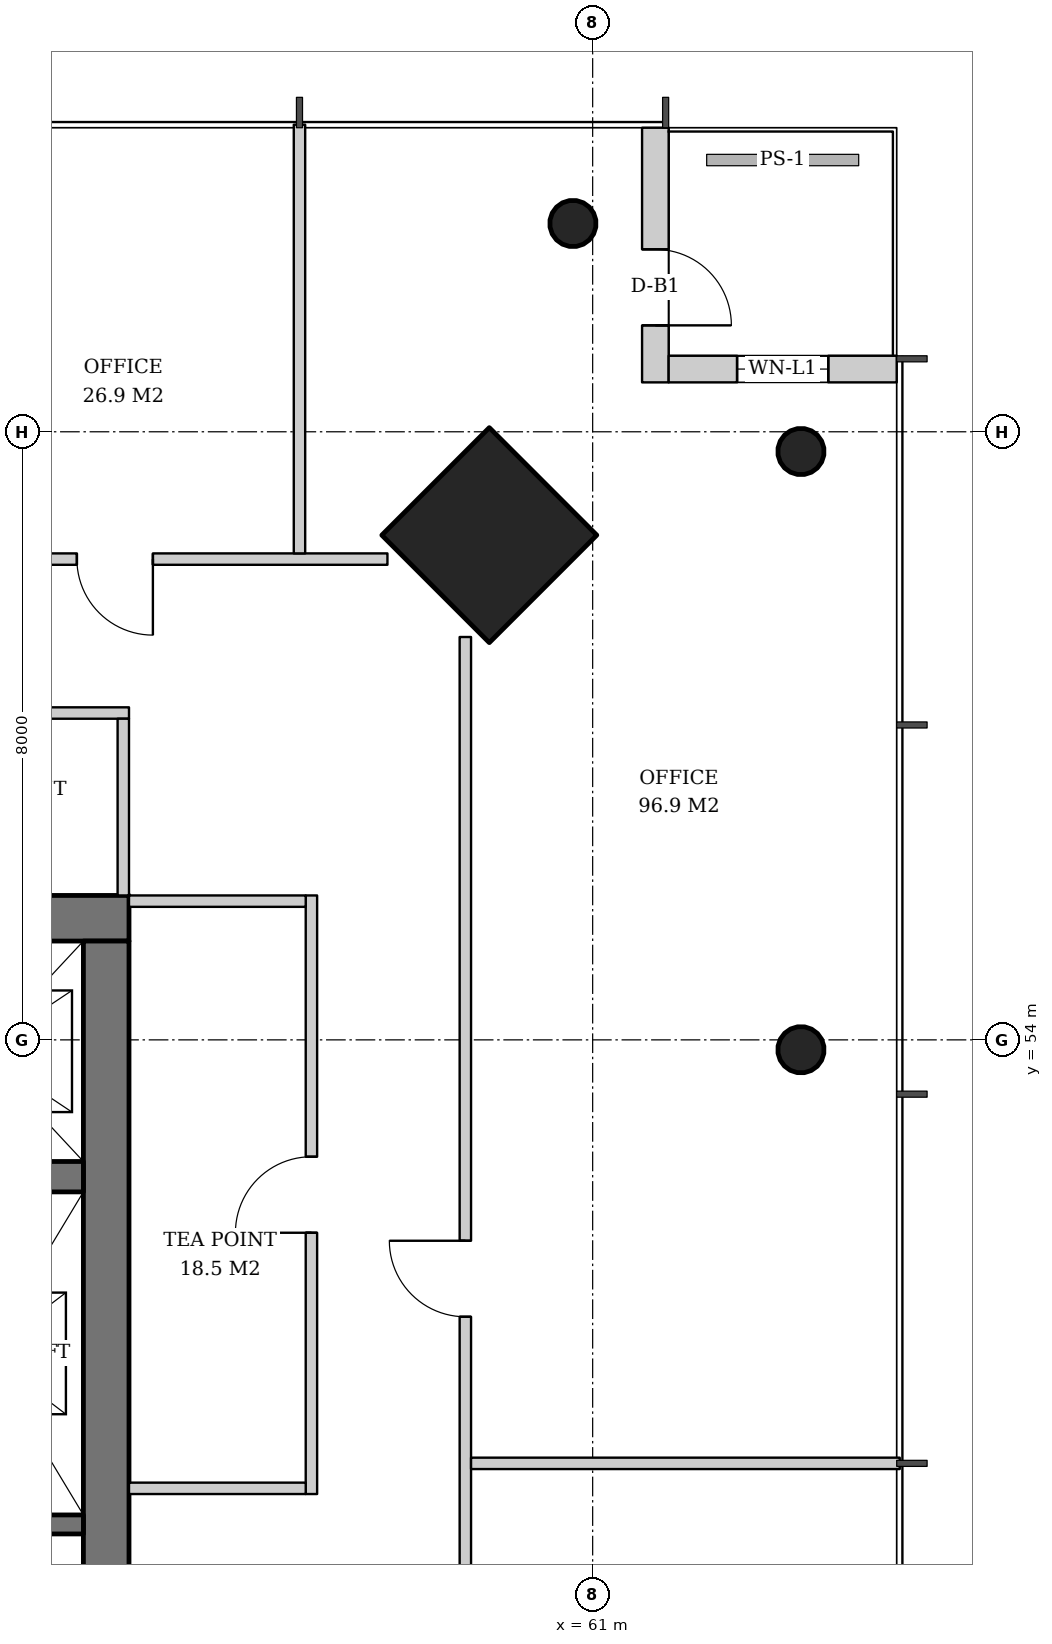
"""IFC4 building model, lengths in metres.
Left out: names, types, materials, properties, quantities, classifications, styles, units other than length and angle.
Written with IfcOpenShell. Run it as: python <this file> out.ifc"""

import sys

from ifc_helpers import new_model, si_unit, direction, frame, frame_2d, origin, origin_2d, place, context, subcontext, project, spatial, rectangle, hollow_circle, extrude, element, fill, save


model = new_model("IFC4")
c1 = context("Model", 3, precision=1e-05, world=origin(), true_north=direction((0.0, 1.0)))
c2 = subcontext(c1, "Body", "Model", "MODEL_VIEW")
j1 = project(units=[si_unit("LENGTHUNIT", "METRE"), si_unit("PLANEANGLEUNIT", "RADIAN")], contexts=[c1])
p1 = place(None, origin())
s1 = spatial("IfcSite", under=j1, at=p1, CompositionType="ELEMENT")
p2 = place(p1, origin())
s2 = spatial("IfcBuilding", under=s1, at=p2, CompositionType="ELEMENT")
p3 = place(p2, frame((0.0, 0.0, 184.4)))
s3 = spatial("IfcBuildingStorey", under=s2, at=p3, CompositionType="ELEMENT", Elevation=184.4)
p4 = place(p3, frame((59.678, 60.678, 0.0), z_axis=(-0.031898107953, -0.031898107953, 0.998981992539), x_axis=(0.707106781187, -0.707106781187, 0.0)))
e1 = element("IfcColumn", 1, at=p4, inside=s3, PredefinedType="COLUMN", context=c2, shape_type="SweptSolid", body=[
    extrude(rectangle(XDim=2.0, YDim=2.0, at=origin_2d()), origin(), (0.0, 0.0, 1.0), 3.804),
])
p5 = place(p3, frame((63.779, 61.779, 0.0), z_axis=(-0.031898107953, -0.031898107953, 0.998981992539), x_axis=(0.707106781187, -0.707106781187, 0.0)))
e2 = element("IfcColumn", 2, at=p5, inside=s3, PredefinedType="COLUMN", context=c2, shape_type="SweptSolid", body=[
    extrude(hollow_circle(Radius=0.305, WallThickness=0.025, at=origin_2d()), origin(), (0.0, 0.0, 1.0), 3.804),
])
p6 = place(p3, frame((63.779, 53.889, 0.0), z_axis=(-0.031910269556, -0.015987237665, 0.999362868496), x_axis=(0.447933021895, -0.894067115991, 0.0)))
e3 = element("IfcColumn", 3, at=p6, inside=s3, PredefinedType="COLUMN", context=c2, shape_type="SweptSolid", body=[
    extrude(hollow_circle(Radius=0.305, WallThickness=0.025, at=origin_2d()), origin(), (0.0, 0.0, 1.0), 3.802),
])
p7 = place(p3, frame((60.779, 64.779, 0.0), z_axis=(-0.031898107953, -0.031898107953, 0.998981992539), x_axis=(0.707106781187, -0.707106781187, 0.0)))
e4 = element("IfcColumn", 4, at=p7, inside=s3, PredefinedType="COLUMN", context=c2, shape_type="SweptSolid", body=[
    extrude(hollow_circle(Radius=0.305, WallThickness=0.025, at=origin_2d()), origin(), (0.0, 0.0, 1.0), 3.804),
])
p8 = place(p3, frame((35.1, 55.6, 0.0), z_axis=(0.0, 0.0, 1.0), x_axis=(1.0, 0.0, 0.0)))
e5 = element("IfcWall", 5, at=p8, inside=s3, PredefinedType="SHEAR", context=c2, shape_type="SweptSolid", body=[
    extrude(rectangle(XDim=19.8, YDim=0.6, at=frame_2d((9.9, 0.0))), origin(), (0.0, 0.0, 1.0), 3.8),
])
p9 = place(p8, frame((14.54, 0.0, 0.0)))
e6 = element("IfcOpeningElement", 6, at=p9, cuts=e5, PredefinedType="OPENING", context=c2, shape_type="SweptSolid", body=[
    extrude(rectangle(XDim=1.0, YDim=2.1, at=frame_2d((0.5, 1.05))), frame((0.0, 0.31, 0.0), z_axis=(0.0, -1.0, 0.0), x_axis=(1.0, 0.0, 0.0)), (0.0, 0.0, 1.0), 0.62),
])
p10 = place(p8, frame((1.8, 0.0, 0.0)))
e7 = element("IfcOpeningElement", 7, at=p10, cuts=e5, PredefinedType="OPENING", context=c2, shape_type="SweptSolid", body=[
    extrude(rectangle(XDim=1.0, YDim=2.1, at=frame_2d((0.5, 1.05))), frame((0.0, 0.31, 0.0), z_axis=(0.0, -1.0, 0.0), x_axis=(1.0, 0.0, 0.0)), (0.0, 0.0, 1.0), 0.62),
])
p11 = place(p8, frame((3.913, 0.0, 0.0)))
e8 = element("IfcOpeningElement", 8, at=p11, cuts=e5, PredefinedType="OPENING", context=c2, shape_type="SweptSolid", body=[
    extrude(rectangle(XDim=1.0, YDim=2.1, at=frame_2d((0.5, 1.05))), frame((0.0, 0.31, 0.0), z_axis=(0.0, -1.0, 0.0), x_axis=(1.0, 0.0, 0.0)), (0.0, 0.0, 1.0), 0.62),
])
p12 = place(p3, frame((54.6, 36.7, 0.0), z_axis=(0.0, 0.0, 1.0), x_axis=(0.0, 1.0, 0.0)))
e9 = element("IfcWall", 9, at=p12, inside=s3, PredefinedType="SHEAR", context=c2, shape_type="SweptSolid", body=[
    extrude(rectangle(XDim=18.6, YDim=0.6, at=frame_2d((9.3, 0.0))), origin(), (0.0, 0.0, 1.0), 3.8),
])
p13 = place(p12, frame((8.4, 0.0, 0.0)))
e10 = element("IfcOpeningElement", 10, at=p13, cuts=e9, PredefinedType="OPENING", context=c2, shape_type="SweptSolid", body=[
    extrude(rectangle(XDim=1.8, YDim=2.4, at=frame_2d((0.9, 1.2))), frame((0.0, 0.31, 0.0), z_axis=(0.0, -1.0, 0.0), x_axis=(1.0, 0.0, 0.0)), (0.0, 0.0, 1.0), 0.62),
])
p14 = place(p3, frame((35.7, 52.2, 0.0), z_axis=(0.0, 0.0, 1.0), x_axis=(1.0, 0.0, 0.0)))
e11 = element("IfcWall", 11, at=p14, inside=s3, PredefinedType="SHEAR", context=c2, shape_type="SweptSolid", body=[
    extrude(rectangle(XDim=18.6, YDim=0.4, at=frame_2d((9.3, 0.0))), origin(), (0.0, 0.0, 1.0), 3.8),
])
p15 = place(p3, frame((61.825, 66.0, 0.0), z_axis=(0.0, 0.0, 1.0), x_axis=(0.0, -1.0, 0.0)))
e12 = element("IfcWall", 12, at=p15, inside=s3, PredefinedType="SOLIDWALL", context=c2, shape_type="SweptSolid", body=[
    extrude(rectangle(XDim=3.35, YDim=0.35, at=frame_2d((1.675, 0.0))), origin(), (0.0, 0.0, 1.0), 3.62),
])
p16 = place(p15, frame((1.6, 0.0, 0.0)))
e13 = element("IfcOpeningElement", 13, at=p16, cuts=e12, PredefinedType="OPENING", context=c2, shape_type="SweptSolid", body=[
    extrude(rectangle(XDim=1.0, YDim=2.4, at=frame_2d((0.5, 1.2))), frame((0.0, 0.185, 0.0), z_axis=(0.0, -1.0, 0.0), x_axis=(1.0, 0.0, 0.0)), (0.0, 0.0, 1.0), 0.37),
])
p17 = place(p3, frame((62.0, 62.825, 0.0), z_axis=(0.0, 0.0, 1.0), x_axis=(1.0, 0.0, 0.0)))
e14 = element("IfcWall", 14, at=p17, inside=s3, PredefinedType="SOLIDWALL", context=c2, shape_type="SweptSolid", body=[
    extrude(rectangle(XDim=3.0, YDim=0.35, at=frame_2d((1.5, 0.0))), origin(), (0.0, 0.0, 1.0), 3.62),
])
p18 = place(p17, frame((0.9, 0.0, 0.6)))
e15 = element("IfcOpeningElement", 15, at=p18, cuts=e14, PredefinedType="OPENING", context=c2, shape_type="SweptSolid", body=[
    extrude(rectangle(XDim=1.2, YDim=2.55, at=frame_2d((0.6, 1.275))), frame((0.0, 0.185, 0.0), z_axis=(0.0, -1.0, 0.0), x_axis=(1.0, 0.0, 0.0)), (0.0, 0.0, 1.0), 0.37),
])
p19 = place(p3, frame((48.93, 47.625, 0.0), z_axis=(0.0, 0.0, 1.0), x_axis=(1.0, 0.0, 0.0)))
e16 = element("IfcWall", 16, at=p19, inside=s3, PredefinedType="SHEAR", context=c2, shape_type="SweptSolid", body=[
    extrude(rectangle(XDim=5.37, YDim=0.25, at=frame_2d((2.685, 0.0))), origin(), (0.0, 0.0, 1.0), 3.8),
])
p20 = place(p3, frame((57.3, 48.025, 0.0), z_axis=(0.0, 0.0, 1.0), x_axis=(0.0, 1.0, 0.0)))
e17 = element("IfcWall", 17, at=p20, inside=s3, PredefinedType="PARTITIONING", context=c2, shape_type="SweptSolid", body=[
    extrude(rectangle(XDim=7.875, YDim=0.15, at=frame_2d((3.938, 0.0))), origin(), (0.0, 0.0, 1.0), 2.867),
])
p21 = place(p20, frame((3.438, 0.0, 0.0)))
e18 = element("IfcOpeningElement", 18, at=p21, cuts=e17, PredefinedType="OPENING", context=c2, shape_type="SweptSolid", body=[
    extrude(rectangle(XDim=1.0, YDim=2.1, at=frame_2d((0.5, 1.05))), frame((0.0, 0.085, 0.0), z_axis=(0.0, -1.0, 0.0), x_axis=(1.0, 0.0, 0.0)), (0.0, 0.0, 1.0), 0.17),
])
for number, where, z_axis, x_axis in (
    (19, (54.9, 48.1, 0.0), (0.0, 0.0, 1.0), (1.0, 0.0, 0.0)),
    (20, (54.9, 55.825, 0.0), (0.0, 0.0, 1.0), (1.0, 0.0, 0.0)),
):
    element("IfcWall", number, at=place(p3, frame(where, z_axis=z_axis, x_axis=x_axis)), inside=s3, PredefinedType="PARTITIONING", context=c2, shape_type="SweptSolid", body=[
        extrude(rectangle(XDim=2.325, YDim=0.15, at=frame_2d((1.163, 0.0))), origin(), (0.0, 0.0, 1.0), 3.62),
    ])
p22 = place(p3, frame((54.9, 58.3, 0.0), z_axis=(0.0, 0.0, 1.0), x_axis=(-1.0, 0.0, 0.0)))
e21 = element("IfcWall", 21, at=p22, inside=s3, PredefinedType="PARTITIONING", context=c2, shape_type="SweptSolid", body=[
    extrude(rectangle(XDim=3.135, YDim=0.15, at=frame_2d((1.567, 0.0))), origin(), (0.0, 0.0, 1.0), 2.92),
])
p23 = place(p22, frame((1.067, 0.0, 0.0)))
e22 = element("IfcOpeningElement", 22, at=p23, cuts=e21, PredefinedType="OPENING", context=c2, shape_type="SweptSolid", body=[
    extrude(rectangle(XDim=1.0, YDim=2.1, at=frame_2d((0.5, 1.05))), frame((0.0, 0.085, 0.0), z_axis=(0.0, -1.0, 0.0), x_axis=(1.0, 0.0, 0.0)), (0.0, 0.0, 1.0), 0.17),
])
p24 = place(p3, frame((54.825, 55.9, 0.0), z_axis=(0.0, 0.0, 1.0), x_axis=(0.0, 1.0, 0.0)))
e23 = element("IfcWall", 23, at=p24, inside=s3, PredefinedType="PARTITIONING", context=c2, shape_type="SweptSolid", body=[
    extrude(rectangle(XDim=2.325, YDim=0.15, at=frame_2d((1.163, 0.0))), origin(), (0.0, 0.0, 1.0), 2.867),
])
p25 = place(p3, frame((59.325, 32.7, 0.0), z_axis=(0.0, 0.0, 1.0), x_axis=(0.0, 1.0, 0.0)))
e24 = element("IfcWall", 24, at=p25, inside=s3, PredefinedType="PARTITIONING", context=c2, shape_type="SweptSolid", body=[
    extrude(rectangle(XDim=26.6, YDim=0.15, at=frame_2d((13.3, 0.0))), origin(), (0.0, 0.0, 1.0), 2.867),
])
p26 = place(p25, frame((3.086, 0.0, 0.0)))
e25 = element("IfcOpeningElement", 25, at=p26, cuts=e24, PredefinedType="OPENING", context=c2, shape_type="SweptSolid", body=[
    extrude(rectangle(XDim=1.0, YDim=2.1, at=frame_2d((0.5, 1.05))), frame((0.0, 0.085, 0.0), z_axis=(0.0, -1.0, 0.0), x_axis=(1.0, 0.0, 0.0)), (0.0, 0.0, 1.0), 0.17),
])
p27 = place(p25, frame((7.943, 0.0, 0.0)))
e26 = element("IfcOpeningElement", 26, at=p27, cuts=e24, PredefinedType="OPENING", context=c2, shape_type="SweptSolid", body=[
    extrude(rectangle(XDim=1.0, YDim=2.1, at=frame_2d((0.5, 1.05))), frame((0.0, 0.085, 0.0), z_axis=(0.0, -1.0, 0.0), x_axis=(1.0, 0.0, 0.0)), (0.0, 0.0, 1.0), 0.17),
])
p28 = place(p25, frame((12.8, 0.0, 0.0)))
e27 = element("IfcOpeningElement", 27, at=p28, cuts=e24, PredefinedType="OPENING", context=c2, shape_type="SweptSolid", body=[
    extrude(rectangle(XDim=1.0, YDim=2.1, at=frame_2d((0.5, 1.05))), frame((0.0, 0.085, 0.0), z_axis=(0.0, -1.0, 0.0), x_axis=(1.0, 0.0, 0.0)), (0.0, 0.0, 1.0), 0.17),
])
p29 = place(p25, frame((17.657, 0.0, 0.0)))
e28 = element("IfcOpeningElement", 28, at=p29, cuts=e24, PredefinedType="OPENING", context=c2, shape_type="SweptSolid", body=[
    extrude(rectangle(XDim=1.0, YDim=2.1, at=frame_2d((0.5, 1.05))), frame((0.0, 0.085, 0.0), z_axis=(0.0, -1.0, 0.0), x_axis=(1.0, 0.0, 0.0)), (0.0, 0.0, 1.0), 0.17),
])
p30 = place(p3, frame((59.4, 48.428, 0.0), z_axis=(0.0, 0.0, 1.0), x_axis=(1.0, 0.0, 0.0)))
e29 = element("IfcWall", 29, at=p30, inside=s3, PredefinedType="PARTITIONING", context=c2, shape_type="SweptSolid", body=[
    extrude(rectangle(XDim=5.64, YDim=0.15, at=frame_2d((2.82, 0.0))), origin(), (0.0, 0.0, 1.0), 2.867),
])
p31 = place(p3, frame((58.3, 60.325, 0.0), z_axis=(0.0, 0.0, 1.0), x_axis=(-1.0, 0.0, 0.0)))
e30 = element("IfcWall", 30, at=p31, inside=s3, PredefinedType="PARTITIONING", context=c2, shape_type="SweptSolid", body=[
    extrude(rectangle(XDim=26.6, YDim=0.15, at=frame_2d((13.3, 0.0))), origin(), (0.0, 0.0, 1.0), 2.867),
])
p32 = place(p31, frame((3.086, 0.0, 0.0)))
e31 = element("IfcOpeningElement", 31, at=p32, cuts=e30, PredefinedType="OPENING", context=c2, shape_type="SweptSolid", body=[
    extrude(rectangle(XDim=1.0, YDim=2.1, at=frame_2d((0.5, 1.05))), frame((0.0, 0.085, 0.0), z_axis=(0.0, -1.0, 0.0), x_axis=(1.0, 0.0, 0.0)), (0.0, 0.0, 1.0), 0.17),
])
p33 = place(p31, frame((7.943, 0.0, 0.0)))
e32 = element("IfcOpeningElement", 32, at=p33, cuts=e30, PredefinedType="OPENING", context=c2, shape_type="SweptSolid", body=[
    extrude(rectangle(XDim=1.0, YDim=2.1, at=frame_2d((0.5, 1.05))), frame((0.0, 0.085, 0.0), z_axis=(0.0, -1.0, 0.0), x_axis=(1.0, 0.0, 0.0)), (0.0, 0.0, 1.0), 0.17),
])
p34 = place(p31, frame((12.8, 0.0, 0.0)))
e33 = element("IfcOpeningElement", 33, at=p34, cuts=e30, PredefinedType="OPENING", context=c2, shape_type="SweptSolid", body=[
    extrude(rectangle(XDim=1.0, YDim=2.1, at=frame_2d((0.5, 1.05))), frame((0.0, 0.085, 0.0), z_axis=(0.0, -1.0, 0.0), x_axis=(1.0, 0.0, 0.0)), (0.0, 0.0, 1.0), 0.17),
])
p35 = place(p31, frame((17.657, 0.0, 0.0)))
e34 = element("IfcOpeningElement", 34, at=p35, cuts=e30, PredefinedType="OPENING", context=c2, shape_type="SweptSolid", body=[
    extrude(rectangle(XDim=1.0, YDim=2.1, at=frame_2d((0.5, 1.05))), frame((0.0, 0.085, 0.0), z_axis=(0.0, -1.0, 0.0), x_axis=(1.0, 0.0, 0.0)), (0.0, 0.0, 1.0), 0.17),
])
p36 = place(p3, frame((57.143, 60.4, 0.0), z_axis=(0.0, 0.0, 1.0), x_axis=(0.0, 1.0, 0.0)))
e35 = element("IfcWall", 35, at=p36, inside=s3, PredefinedType="PARTITIONING", context=c2, shape_type="SweptSolid", body=[
    extrude(rectangle(XDim=5.64, YDim=0.15, at=frame_2d((2.82, 0.0))), origin(), (0.0, 0.0, 1.0), 3.12),
])
p37 = place(p16, origin())
e36 = element("IfcDoor", 36, at=p37, inside=s3, OperationType="SINGLE_SWING_RIGHT", PredefinedType="DOOR", context=c2, shape_type="SweptSolid", body=[
    extrude(rectangle(XDim=1.0, YDim=2.4, at=frame_2d((0.5, 1.2))), frame((0.0, 0.025, 0.0), z_axis=(0.0, -1.0, 0.0), x_axis=(1.0, 0.0, 0.0)), (0.0, 0.0, 1.0), 0.05),
])
fill(e13, e36)
p38 = place(p18, origin())
e37 = element("IfcWindow", 37, at=p38, inside=s3, PartitioningType="SINGLE_PANEL", PredefinedType="WINDOW", context=c2, shape_type="SweptSolid", body=[
    extrude(rectangle(XDim=1.2, YDim=2.55, at=frame_2d((0.6, 1.275))), frame((0.0, 0.03, 0.0), z_axis=(0.0, -1.0, 0.0), x_axis=(1.0, 0.0, 0.0)), (0.0, 0.0, 1.0), 0.06),
])
fill(e15, e37)
p39 = place(p21, origin())
e38 = element("IfcDoor", 38, at=p39, inside=s3, OperationType="SINGLE_SWING_LEFT", PredefinedType="DOOR", context=c2, shape_type="SweptSolid", body=[
    extrude(rectangle(XDim=1.0, YDim=2.1, at=frame_2d((0.5, 1.05))), frame((0.0, 0.025, 0.0), z_axis=(0.0, -1.0, 0.0), x_axis=(1.0, 0.0, 0.0)), (0.0, 0.0, 1.0), 0.05),
])
fill(e18, e38)
p40 = place(p29, origin())
e39 = element("IfcDoor", 39, at=p40, inside=s3, OperationType="SINGLE_SWING_RIGHT", PredefinedType="DOOR", context=c2, shape_type="SweptSolid", body=[
    extrude(rectangle(XDim=1.0, YDim=2.1, at=frame_2d((0.5, 1.05))), frame((0.0, 0.025, 0.0), z_axis=(0.0, -1.0, 0.0), x_axis=(1.0, 0.0, 0.0)), (0.0, 0.0, 1.0), 0.05),
])
fill(e28, e39)
p41 = place(p32, origin())
e40 = element("IfcDoor", 40, at=p41, inside=s3, OperationType="SINGLE_SWING_LEFT", PredefinedType="DOOR", context=c2, shape_type="SweptSolid", body=[
    extrude(rectangle(XDim=1.0, YDim=2.1, at=frame_2d((0.5, 1.05))), frame((0.0, 0.025, 0.0), z_axis=(0.0, -1.0, 0.0), x_axis=(1.0, 0.0, 0.0)), (0.0, 0.0, 1.0), 0.05),
])
fill(e31, e40)
save(model, sys.argv[1])
